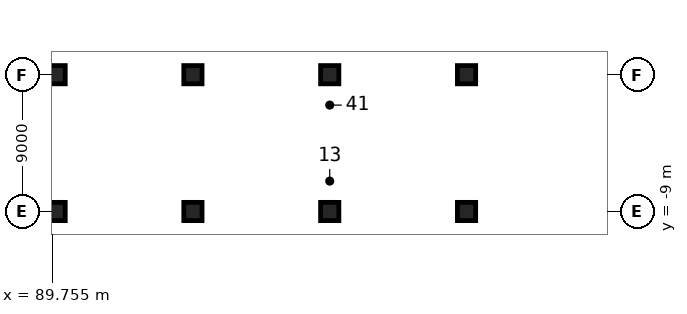
"""IFC4 building model, lengths in metres.
Left out: names, types, materials, properties, quantities, classifications, styles, units other than length and angle.
Written with IfcOpenShell. Run it as: python <this file> out.ifc"""

import sys

from ifc_helpers import new_model, si_unit, direction, frame, origin, origin_2d, place, context, subcontext, project, spatial, rectangle, extrude, element, save


model = new_model("IFC4")
c1 = context("Model", 3, precision=1e-05, world=origin(), true_north=direction((0.0, 1.0)))
c2 = subcontext(c1, "Body", "Model", "MODEL_VIEW")
j1 = project(units=[si_unit("LENGTHUNIT", "METRE"), si_unit("PLANEANGLEUNIT", "RADIAN")], contexts=[c1])
p1 = place(None, origin())
s1 = spatial("IfcSite", under=j1, at=p1, CompositionType="ELEMENT")
p2 = place(p1, origin())
s2 = spatial("IfcBuilding", under=s1, at=p2, CompositionType="ELEMENT")
p3 = place(p2, frame((0.0, 0.0, -9.0)))
s3 = spatial("IfcBuildingStorey", under=s2, at=p3, CompositionType="ELEMENT", Elevation=-9.0)
for number, where, z_axis, x_axis in (
    (1, (90.0, -9.0, 0.0), (0.0, 0.0, 1.0), (1.0, 0.0, 0.0)),
    (2, (90.0, 0.0, 0.0), (0.0, 0.0, 1.0), (1.0, 0.0, 0.0)),
    (3, (99.0, -9.0, 0.0), (0.0, 0.0, 1.0), (1.0, 0.0, 0.0)),
    (4, (99.0, 0.0, 0.0), (0.0, 0.0, 1.0), (1.0, 0.0, 0.0)),
    (5, (108.0, -9.0, 0.0), (0.0, 0.0, 1.0), (1.0, 0.0, 0.0)),
    (6, (108.0, 0.0, 0.0), (0.0, 0.0, 1.0), (1.0, 0.0, 0.0)),
    (7, (117.0, -9.0, 0.0), (0.0, 0.0, 1.0), (1.0, 0.0, 0.0)),
    (8, (117.0, 0.0, 0.0), (0.0, 0.0, 1.0), (1.0, 0.0, 0.0)),
):
    element("IfcColumn", number, at=place(p3, frame(where, z_axis=z_axis, x_axis=x_axis)), inside=s3, PredefinedType="COLUMN", context=c2, shape_type="SweptSolid", body=[
        extrude(rectangle(XDim=1.2, YDim=1.2, at=origin_2d()), origin(), (0.0, 0.0, 1.0), 4.5),
    ])
save(model, sys.argv[1])
